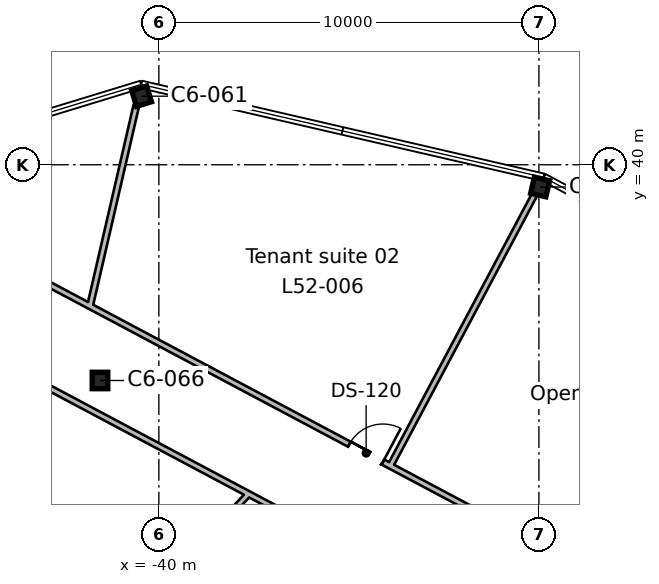
"""IFC4 building model, lengths in metres.
Left out: names, types, materials, properties, quantities, classifications, styles, units other than length and angle.
Written with IfcOpenShell. Run it as: python <this file> out.ifc"""

import sys

from ifc_helpers import new_model, si_unit, direction, frame, frame_2d, origin, origin_2d, place, context, subcontext, project, spatial, rectangle, i_section, extrude, element, fill, save


model = new_model("IFC4")
c1 = context("Model", 3, precision=1e-05, world=origin(), true_north=direction((0.0, 1.0)))
c2 = subcontext(c1, "Body", "Model", "MODEL_VIEW")
j1 = project(units=[si_unit("LENGTHUNIT", "METRE"), si_unit("PLANEANGLEUNIT", "RADIAN")], contexts=[c1])
p1 = place(None, origin())
s1 = spatial("IfcSite", under=j1, at=p1, CompositionType="ELEMENT")
p2 = place(p1, origin())
s2 = spatial("IfcBuilding", under=s1, at=p2, CompositionType="ELEMENT")
p3 = place(p2, frame((0.0, 0.0, 236.4)))
s3 = spatial("IfcBuildingStorey", under=s2, at=p3, CompositionType="ELEMENT", Elevation=236.4)
for number, where, z_axis, x_axis in (
    (1, (-41.549, 34.324, 0.0), (0.0, 0.0, 1.0), (1.0, 0.0, 0.0)),
    (2, (-29.968, 39.415, 0.0), (0.0, 0.0, 1.0), (-0.974, 0.225, 0.0)),
    (3, (-40.455, 41.804, 0.0), (0.0, 0.0, 1.0), (-0.956, -0.292, 0.0)),
):
    element("IfcColumn", number, at=place(p3, frame(where, z_axis=z_axis, x_axis=x_axis)), inside=s3, PredefinedType="COLUMN", context=c2, shape_type="SweptSolid", body=[
        extrude(i_section(OverallWidth=0.412, OverallDepth=0.434, WebThickness=0.036, FlangeThickness=0.057, FilletRadius=0.015, at=origin_2d()), origin(), (0.0, 0.0, 1.0), 3.9),
    ])
p4 = place(p3, frame((-37.64, 31.339, 0.0), z_axis=(0.0, 0.0, 1.0), x_axis=(-0.681983873773, -0.731367210035, 0.0)))
e4 = element("IfcWall", 4, at=p4, inside=s3, PredefinedType="PARTITIONING", context=c2, shape_type="SweptSolid", body=[
    extrude(rectangle(XDim=3.461, YDim=0.15, at=frame_2d((1.73, 0.0))), origin(), (0.0, 0.0, 1.0), 3.54),
])
p5 = place(p3, frame((-34.332, 29.58, 0.0), z_axis=(0.0, 0.0, 1.0), x_axis=(-0.882939350293, 0.46948706447, 0.0)))
e5 = element("IfcWall", 5, at=p5, inside=s3, PredefinedType="PARTITIONING", context=c2, shape_type="SweptSolid", body=[
    extrude(rectangle(XDim=19.327, YDim=0.15, at=frame_2d((9.664, 0.0))), origin(), (0.0, 0.0, 1.0), 3.54),
])
p6 = place(p3, frame((-48.541, 39.854, 0.0), z_axis=(0.0, 0.0, 1.0), x_axis=(0.882945008423, -0.469476423372, 0.0)))
e6 = element("IfcWall", 6, at=p6, inside=s3, PredefinedType="PARTITIONING", context=c2, shape_type="SweptSolid", body=[
    extrude(rectangle(XDim=54.976, YDim=0.15, at=frame_2d((27.488, 0.0))), origin(), (0.0, 0.0, 1.0), 3.54),
])
p7 = place(p6, frame((39.35, 0.0, 0.0)))
e7 = element("IfcOpeningElement", 7, at=p7, cuts=e6, PredefinedType="OPENING", context=c2, shape_type="SweptSolid", body=[
    extrude(rectangle(XDim=1.0, YDim=2.1, at=frame_2d((0.5, 1.05))), frame((0.0, 0.085, 0.0), z_axis=(0.0, -1.0, 0.0), x_axis=(1.0, 0.0, 0.0)), (0.0, 0.0, 1.0), 0.17),
])
p8 = place(p6, frame((26.55, 0.0, 0.0)))
e8 = element("IfcOpeningElement", 8, at=p8, cuts=e6, PredefinedType="OPENING", context=c2, shape_type="SweptSolid", body=[
    extrude(rectangle(XDim=1.8, YDim=2.1, at=frame_2d((0.9, 1.05))), frame((0.0, 0.085, 0.0), z_axis=(0.0, -1.0, 0.0), x_axis=(1.0, 0.0, 0.0)), (0.0, 0.0, 1.0), 0.17),
])
p9 = place(p6, frame((15.35, 0.0, 0.0)))
e9 = element("IfcOpeningElement", 9, at=p9, cuts=e6, PredefinedType="OPENING", context=c2, shape_type="SweptSolid", body=[
    extrude(rectangle(XDim=1.0, YDim=2.1, at=frame_2d((0.5, 1.05))), frame((0.0, 0.085, 0.0), z_axis=(0.0, -1.0, 0.0), x_axis=(1.0, 0.0, 0.0)), (0.0, 0.0, 1.0), 0.17),
])
p10 = place(p3, frame((-30.109, 39.225, 0.0), z_axis=(0.0, 0.0, 1.0), x_axis=(-0.469490973279, -0.882937271843, 0.0)))
e10 = element("IfcWall", 10, at=p10, inside=s3, PredefinedType="PARTITIONING", context=c2, shape_type="SweptSolid", body=[
    extrude(rectangle(XDim=8.098, YDim=0.15, at=frame_2d((4.049, 0.0))), origin(), (0.0, 0.0, 1.0), 3.54),
])
p11 = place(p3, frame((-41.813, 36.276, 0.0), z_axis=(0.0, 0.0, 1.0), x_axis=(0.22495163737, 0.974369930183, 0.0)))
e11 = element("IfcWall", 11, at=p11, inside=s3, PredefinedType="PARTITIONING", context=c2, shape_type="SweptSolid", body=[
    extrude(rectangle(XDim=5.419, YDim=0.15, at=frame_2d((2.709, 0.0))), origin(), (0.0, 0.0, 1.0), 3.54),
])
p12 = place(p9, origin())
e12 = element("IfcDoor", 12, at=p12, inside=s3, OperationType="SINGLE_SWING_RIGHT", PredefinedType="DOOR", context=c2, shape_type="SweptSolid", body=[
    extrude(rectangle(XDim=1.0, YDim=2.1, at=frame_2d((0.5, 1.05))), frame((0.0, 0.025, 0.0), z_axis=(0.0, -1.0, 0.0), x_axis=(1.0, 0.0, 0.0)), (0.0, 0.0, 1.0), 0.05),
])
fill(e9, e12)
save(model, sys.argv[1])
